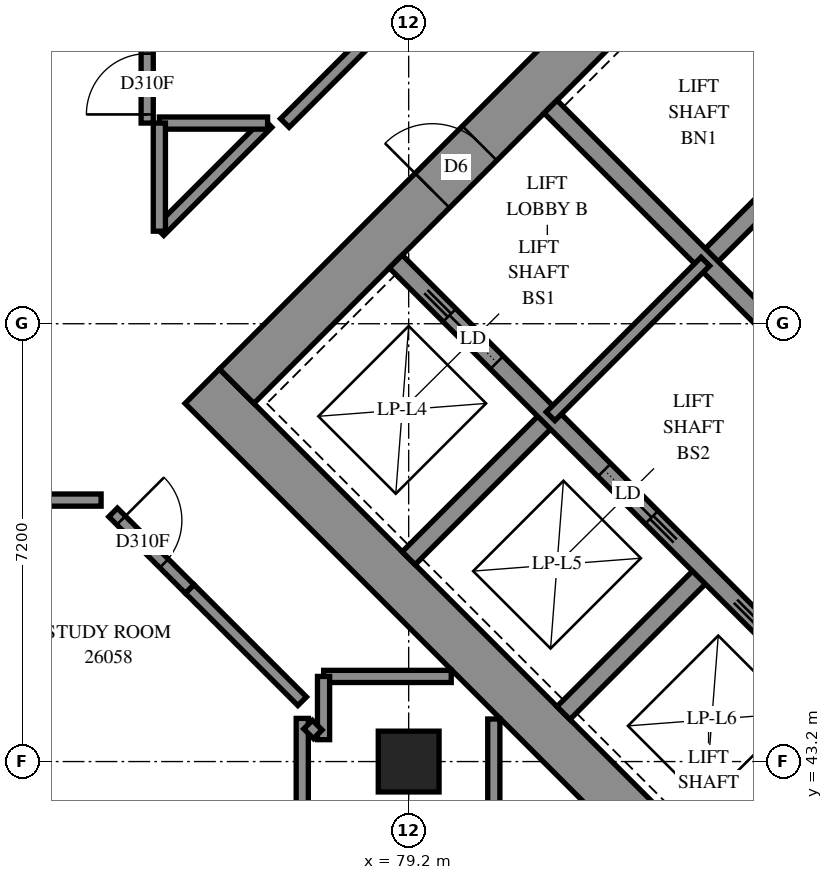
"""IFC4 building model, lengths in metres.
Left out: names, types, materials, properties, quantities, classifications, styles, units other than length and angle.
Written with IfcOpenShell. Run it as: python <this file> out.ifc"""

import sys

from ifc_helpers import new_model, si_unit, direction, frame, frame_2d, origin, origin_2d, place, context, subcontext, project, spatial, polyline, rectangle, outline, extrude, element, fill, save


model = new_model("IFC4")
c1 = context("Model", 3, precision=1e-05, world=origin(), true_north=direction((0.0, 1.0)))
c2 = subcontext(c1, "Body", "Model", "MODEL_VIEW")
j1 = project(units=[si_unit("LENGTHUNIT", "METRE"), si_unit("PLANEANGLEUNIT", "RADIAN")], contexts=[c1])
p1 = place(None, origin())
s1 = spatial("IfcSite", under=j1, at=p1, CompositionType="ELEMENT")
p2 = place(p1, origin())
s2 = spatial("IfcBuilding", under=s1, at=p2, CompositionType="ELEMENT")
p3 = place(p2, frame((0.0, 0.0, 98.2)))
s3 = spatial("IfcBuildingStorey", under=s2, at=p3, CompositionType="ELEMENT", Elevation=98.2)
p4 = place(p3, frame((79.2, 43.2, 0.0), z_axis=(0.0, 0.0, 1.0), x_axis=(1.0, 0.0, 0.0)))
e1 = element("IfcColumn", 1, at=p4, inside=s3, PredefinedType="COLUMN", context=c2, shape_type="SweptSolid", body=[
    extrude(rectangle(XDim=1.0, YDim=1.0, at=origin_2d()), origin(), (0.0, 0.0, 1.0), 3.1),
])
p5 = place(p3, frame((75.806, 49.373, -0.3), z_axis=(0.0, 0.0, 1.0), x_axis=(0.7071067812, -0.7071067812, 0.0)))
e2 = element("IfcWall", 2, at=p5, inside=s3, PredefinedType="SHEAR", context=c2, shape_type="SweptSolid", body=[
    extrude(rectangle(XDim=16.0, YDim=0.8, at=frame_2d((8.0, 0.0))), origin(), (0.0, 0.0, 1.0), 2.7),
])
p6 = place(p3, frame((76.372, 49.373, -0.3), z_axis=(0.0, 0.0, 1.0), x_axis=(0.7071067812, 0.7071067812, 0.0)))
e3 = element("IfcWall", 3, at=p6, inside=s3, PredefinedType="SHEAR", context=c2, shape_type="SweptSolid", body=[
    extrude(rectangle(XDim=14.4, YDim=0.8, at=frame_2d((7.2, 0.0))), origin(), (0.0, 0.0, 1.0), 2.7),
])
p7 = place(p6, frame((4.55, 0.0, 0.3)))
e4 = element("IfcOpeningElement", 4, at=p7, cuts=e3, PredefinedType="OPENING", context=c2, shape_type="SweptSolid", body=[
    extrude(rectangle(XDim=1.1, YDim=2.1, at=frame_2d((0.55, 1.05))), frame((0.0, 0.41, 0.0), z_axis=(0.0, -1.0, 0.0), x_axis=(1.0, 0.0, 0.0)), (0.0, 0.0, 1.0), 0.82),
])
p8 = place(p6, frame((11.35, 0.0, 0.3)))
e5 = element("IfcOpeningElement", 5, at=p8, cuts=e3, PredefinedType="OPENING", context=c2, shape_type="SweptSolid", body=[
    extrude(rectangle(XDim=1.1, YDim=2.1, at=frame_2d((0.55, 1.05))), frame((0.0, 0.41, 0.0), z_axis=(0.0, -1.0, 0.0), x_axis=(1.0, 0.0, 0.0)), (0.0, 0.0, 1.0), 0.82),
])
for number, where, z_axis, x_axis in (
    (6, (79.2, 46.544, 0.0), (0.0, 0.0, 1.0), (0.707, 0.707, 0.0)),
    (7, (84.079, 51.423, 0.0), (0.0, 0.0, 1.0), (0.707, 0.707, 0.0)),
):
    element("IfcWall", number, at=place(p3, frame(where, z_axis=z_axis, x_axis=x_axis)), inside=s3, PredefinedType="SOLIDWALL", context=c2, shape_type="SweptSolid", body=[
        extrude(rectangle(XDim=3.3, YDim=0.3, at=frame_2d((1.65, 0.0))), origin(), (0.0, 0.0, 1.0), 3.1),
    ])
for number, where, z_axis, x_axis in (
    (8, (81.746, 43.999, 0.0), (0.0, 0.0, 1.0), (0.707, 0.707, 0.0)),
    (9, (84.291, 41.453, 0.0), (0.0, 0.0, 1.0), (0.707, 0.707, 0.0)),
):
    element("IfcWall", number, at=place(p3, frame(where, z_axis=z_axis, x_axis=x_axis)), inside=s3, PredefinedType="SOLIDWALL", context=c2, shape_type="SweptSolid", body=[
        extrude(rectangle(XDim=3.3, YDim=0.3, at=frame_2d((1.65, 0.0))), origin(), (0.0, 0.0, 1.0), 3.1),
    ])
p9 = place(p3, frame((78.988, 51.423, 0.0), z_axis=(0.0, 0.0, 1.0), x_axis=(0.7071067812, -0.7071067812, 0.0)))
e10 = element("IfcWall", 10, at=p9, inside=s3, PredefinedType="SOLIDWALL", context=c2, shape_type="SweptSolid", body=[
    extrude(rectangle(XDim=14.4, YDim=0.3, at=frame_2d((7.2, 0.0))), origin(), (0.0, 0.0, 1.0), 3.1),
])
p10 = place(p9, frame((1.25, 0.0, 0.0)))
e11 = element("IfcOpeningElement", 11, at=p10, cuts=e10, PredefinedType="OPENING", context=c2, shape_type="SweptSolid", body=[
    extrude(rectangle(XDim=1.1, YDim=2.1, at=frame_2d((0.55, 1.05))), frame((0.0, 0.16, 0.0), z_axis=(0.0, -1.0, 0.0), x_axis=(1.0, 0.0, 0.0)), (0.0, 0.0, 1.0), 0.32),
])
p11 = place(p9, frame((4.85, 0.0, 0.0)))
e12 = element("IfcOpeningElement", 12, at=p11, cuts=e10, PredefinedType="OPENING", context=c2, shape_type="SweptSolid", body=[
    extrude(rectangle(XDim=1.1, YDim=2.1, at=frame_2d((0.55, 1.05))), frame((0.0, 0.16, 0.0), z_axis=(0.0, -1.0, 0.0), x_axis=(1.0, 0.0, 0.0)), (0.0, 0.0, 1.0), 0.32),
])
p12 = place(p9, frame((8.45, 0.0, 0.0)))
e13 = element("IfcOpeningElement", 13, at=p12, cuts=e10, PredefinedType="OPENING", context=c2, shape_type="SweptSolid", body=[
    extrude(rectangle(XDim=1.1, YDim=2.1, at=frame_2d((0.55, 1.05))), frame((0.0, 0.16, 0.0), z_axis=(0.0, -1.0, 0.0), x_axis=(1.0, 0.0, 0.0)), (0.0, 0.0, 1.0), 0.32),
])
p13 = place(p9, frame((12.05, 0.0, 0.0)))
e14 = element("IfcOpeningElement", 14, at=p13, cuts=e10, PredefinedType="OPENING", context=c2, shape_type="SweptSolid", body=[
    extrude(rectangle(XDim=1.1, YDim=2.1, at=frame_2d((0.55, 1.05))), frame((0.0, 0.16, 0.0), z_axis=(0.0, -1.0, 0.0), x_axis=(1.0, 0.0, 0.0)), (0.0, 0.0, 1.0), 0.32),
])
p14 = place(p3, frame((81.534, 53.969, 0.0), z_axis=(0.0, 0.0, 1.0), x_axis=(0.707103309, -0.7071102534, 0.0)))
e15 = element("IfcWall", 15, at=p14, inside=s3, PredefinedType="SOLIDWALL", context=c2, shape_type="SweptSolid", body=[
    extrude(rectangle(XDim=14.4, YDim=0.3, at=frame_2d((7.2, 0.0))), origin(), (0.0, 0.0, 1.0), 3.1),
])
p15 = place(p14, frame((12.05, 0.0, 0.0)))
e16 = element("IfcOpeningElement", 16, at=p15, cuts=e15, PredefinedType="OPENING", context=c2, shape_type="SweptSolid", body=[
    extrude(rectangle(XDim=1.1, YDim=2.1, at=frame_2d((0.55, 1.05))), frame((0.0, 0.16, 0.0), z_axis=(0.0, -1.0, 0.0), x_axis=(1.0, 0.0, 0.0)), (0.0, 0.0, 1.0), 0.32),
])
p16 = place(p3, frame((83.867, 56.302, 0.0), z_axis=(0.0, 0.0, 1.0), x_axis=(0.7071137256, -0.7070998367, 0.0)))
e17 = element("IfcWall", 17, at=p16, inside=s3, PredefinedType="SOLIDWALL", context=c2, shape_type="SweptSolid", body=[
    extrude(rectangle(XDim=7.2, YDim=0.3, at=frame_2d((3.6, 0.0))), origin(), (0.0, 0.0, 1.0), 3.1),
])
p17 = place(p3, frame((73.129, 42.281, 0.0), z_axis=(0.0, 0.0, 1.0), x_axis=(0.9557583549, -0.2941529654, 0.0)))
e18 = element("IfcWall", 18, at=p17, inside=s3, PredefinedType="SOLIDWALL", context=c2, shape_type="SweptSolid", body=[
    extrude(outline(polyline([(0.06, -0.275), (3.633, -0.275), (3.696, 0.275), (-0.06, 0.275), (0.06, -0.275)])), origin(), (0.0, 0.0, 1.0), 3.1),
])
p18 = place(p17, frame((0.793, 0.0, 0.5)))
e19 = element("IfcOpeningElement", 19, at=p18, cuts=e18, PredefinedType="OPENING", context=c2, shape_type="SweptSolid", body=[
    extrude(rectangle(XDim=1.2, YDim=2.45, at=frame_2d((0.6, 1.225))), frame((0.0, 0.285, 0.0), z_axis=(0.0, -1.0, 0.0), x_axis=(1.0, 0.0, 0.0)), (0.0, 0.0, 1.0), 0.57),
])
p19 = place(p3, frame((81.534, 48.878, 0.0), z_axis=(0.0, 0.0, 1.0), x_axis=(0.707092892, 0.7071206701, 0.0)))
e20 = element("IfcWall", 20, at=p19, inside=s3, PredefinedType="PARTITIONING", context=c2, shape_type="SweptSolid", body=[
    extrude(rectangle(XDim=3.6, YDim=0.2, at=frame_2d((1.8, 0.0))), origin(), (0.0, 0.0, 1.0), 3.1),
])
p20 = place(p3, frame((54.7, 47.5, 0.0), z_axis=(0.0, 0.0, 1.0), x_axis=(1.0, 0.0, 0.0)))
e21 = element("IfcWall", 21, at=p20, inside=s3, PredefinedType="PARTITIONING", context=c2, shape_type="SweptSolid", body=[
    extrude(rectangle(XDim=19.442, YDim=0.2, at=frame_2d((9.721, 0.0))), origin(), (0.0, 0.0, 1.0), 3.1),
])
p21 = place(p20, frame((5.2, 0.0, 0.0)))
e22 = element("IfcOpeningElement", 22, at=p21, cuts=e21, PredefinedType="OPENING", context=c2, shape_type="SweptSolid", body=[
    extrude(rectangle(XDim=0.9, YDim=2.1, at=frame_2d((0.45, 1.05))), frame((0.0, 0.11, 0.0), z_axis=(0.0, -1.0, 0.0), x_axis=(1.0, 0.0, 0.0)), (0.0, 0.0, 1.0), 0.22),
])
p22 = place(p20, frame((6.9, 0.0, 0.0)))
e23 = element("IfcOpeningElement", 23, at=p22, cuts=e21, PredefinedType="OPENING", context=c2, shape_type="SweptSolid", body=[
    extrude(rectangle(XDim=0.9, YDim=2.1, at=frame_2d((0.45, 1.05))), frame((0.0, 0.11, 0.0), z_axis=(0.0, -1.0, 0.0), x_axis=(1.0, 0.0, 0.0)), (0.0, 0.0, 1.0), 0.22),
])
p23 = place(p20, frame((13.963, 0.0, 0.0)))
e24 = element("IfcOpeningElement", 24, at=p23, cuts=e21, PredefinedType="OPENING", context=c2, shape_type="SweptSolid", body=[
    extrude(rectangle(XDim=1.0, YDim=2.1, at=frame_2d((0.5, 1.05))), frame((0.0, 0.11, 0.0), z_axis=(0.0, -1.0, 0.0), x_axis=(1.0, 0.0, 0.0)), (0.0, 0.0, 1.0), 0.22),
])
p24 = place(p3, frame((74.9, 53.7, 0.0), z_axis=(0.0, 0.0, 1.0), x_axis=(0.0, 1.0, 0.0)))
e25 = element("IfcWall", 25, at=p24, inside=s3, PredefinedType="PARTITIONING", context=c2, shape_type="SweptSolid", body=[
    extrude(rectangle(XDim=6.052, YDim=0.2, at=frame_2d((3.026, 0.0))), origin(), (0.0, 0.0, 1.0), 3.1),
])
p25 = place(p24, frame((0.142, 0.0, 0.0)))
e26 = element("IfcOpeningElement", 26, at=p25, cuts=e25, PredefinedType="OPENING", context=c2, shape_type="SweptSolid", body=[
    extrude(rectangle(XDim=1.0, YDim=2.1, at=frame_2d((0.5, 1.05))), frame((0.0, 0.11, 0.0), z_axis=(0.0, -1.0, 0.0), x_axis=(1.0, 0.0, 0.0)), (0.0, 0.0, 1.0), 0.22),
])
p26 = place(p3, frame((77.45, 41.046, 0.0), z_axis=(0.0, 0.0, 1.0), x_axis=(0.0, 1.0, 0.0)))
e27 = element("IfcWall", 27, at=p26, inside=s3, PredefinedType="PARTITIONING", context=c2, shape_type="SweptSolid", body=[
    extrude(rectangle(XDim=2.864, YDim=0.2, at=frame_2d((1.432, 0.0))), origin(), (0.0, 0.0, 1.0), 3.1),
])
p27 = place(p3, frame((77.163, 53.701, 0.0), z_axis=(0.0, 0.0, 1.0), x_axis=(0.7071067812, 0.7071067812, 0.0)))
e28 = element("IfcWall", 28, at=p27, inside=s3, PredefinedType="PARTITIONING", context=c2, shape_type="SweptSolid", body=[
    extrude(rectangle(XDim=2.679, YDim=0.2, at=frame_2d((1.339, 0.0))), origin(), (0.0, 0.0, 1.0), 3.1),
])
p28 = place(p3, frame((75.598, 46.04, 0.0), z_axis=(0.0, 0.0, 1.0), x_axis=(0.7074891043, -0.7067242512, 0.0)))
e29 = element("IfcWall", 29, at=p28, inside=s3, PredefinedType="PARTITIONING", context=c2, shape_type="SweptSolid", body=[
    extrude(rectangle(XDim=2.615, YDim=0.2, at=frame_2d((1.308, 0.0))), origin(), (0.0, 0.0, 1.0), 3.1),
])
p29 = place(p3, frame((75.102, 51.922, 0.0), z_axis=(0.0, 0.0, 1.0), x_axis=(0.7071067812, 0.7071067812, 0.0)))
e30 = element("IfcWall", 30, at=p29, inside=s3, PredefinedType="PARTITIONING", context=c2, shape_type="SweptSolid", body=[
    extrude(rectangle(XDim=2.514, YDim=0.2, at=frame_2d((1.257, 0.0))), origin(), (0.0, 0.0, 1.0), 3.1),
])
for number, where, z_axis, x_axis in (
    (31, (77.802, 44.6, 0.0), (0.0, 0.0, 1.0), (1.0, 0.0, 0.0)),
    (32, (80.6, 41.802, 0.0), (0.0, 0.0, 1.0), (0.0, 1.0, 0.0)),
):
    element("IfcWall", number, at=place(p3, frame(where, z_axis=z_axis, x_axis=x_axis)), inside=s3, PredefinedType="PARTITIONING", context=c2, shape_type="SweptSolid", body=[
        extrude(rectangle(XDim=2.098, YDim=0.2, at=frame_2d((1.049, 0.0))), origin(), (0.0, 0.0, 1.0), 3.1),
    ])
p30 = place(p3, frame((75.1, 53.7, 0.0), z_axis=(0.0, 0.0, 1.0), x_axis=(1.0, 0.0, 0.0)))
e33 = element("IfcWall", 33, at=p30, inside=s3, PredefinedType="PARTITIONING", context=c2, shape_type="SweptSolid", body=[
    extrude(rectangle(XDim=1.78, YDim=0.2, at=frame_2d((0.89, 0.0))), origin(), (0.0, 0.0, 1.0), 3.1),
])
p31 = place(p3, frame((74.339, 47.297, 0.0), z_axis=(0.0, 0.0, 1.0), x_axis=(0.7071067812, -0.7071067812, 0.0)))
e34 = element("IfcWall", 34, at=p31, inside=s3, PredefinedType="PARTITIONING", context=c2, shape_type="SweptSolid", body=[
    extrude(rectangle(XDim=1.779, YDim=0.2, at=frame_2d((0.889, 0.0))), origin(), (0.0, 0.0, 1.0), 3.1),
])
p32 = place(p31, frame((0.186, 0.0, 0.0)))
e35 = element("IfcOpeningElement", 35, at=p32, cuts=e34, PredefinedType="OPENING", context=c2, shape_type="SweptSolid", body=[
    extrude(rectangle(XDim=1.0, YDim=2.1, at=frame_2d((0.5, 1.05))), frame((0.0, 0.11, 0.0), z_axis=(0.0, -1.0, 0.0), x_axis=(1.0, 0.0, 0.0)), (0.0, 0.0, 1.0), 0.22),
])
p33 = place(p3, frame((75.1, 51.922, 0.0), z_axis=(0.0, 0.0, 1.0), x_axis=(0.0, 1.0, 0.0)))
e36 = element("IfcWall", 36, at=p33, inside=s3, PredefinedType="PARTITIONING", context=c2, shape_type="SweptSolid", body=[
    extrude(rectangle(XDim=1.778, YDim=0.2, at=frame_2d((0.889, 0.0))), origin(), (0.0, 0.0, 1.0), 3.1),
])
p34 = place(p3, frame((77.8, 43.56, 0.0), z_axis=(0.0, 0.0, 1.0), x_axis=(0.0, 1.0, 0.0)))
e37 = element("IfcWall", 37, at=p34, inside=s3, PredefinedType="PARTITIONING", context=c2, shape_type="SweptSolid", body=[
    extrude(rectangle(XDim=1.04, YDim=0.2, at=frame_2d((0.52, 0.0))), origin(), (0.0, 0.0, 1.0), 3.1),
])
p35 = place(p3, frame((77.546, 43.808, 0.0), z_axis=(0.0, 0.0, 1.0), x_axis=(0.707329037, -0.7068844555, 0.0)))
e38 = element("IfcWall", 38, at=p35, inside=s3, PredefinedType="PARTITIONING", context=c2, shape_type="SweptSolid", body=[
    extrude(rectangle(XDim=0.225, YDim=0.2, at=frame_2d((0.112, 0.0))), origin(), (0.0, 0.0, 1.0), 3.1),
])
p36 = place(p7, origin())
e39 = element("IfcDoor", 39, at=p36, inside=s3, OperationType="DOUBLE_DOOR_SINGLE_SWING", PredefinedType="DOOR", context=c2, shape_type="SweptSolid", body=[
    extrude(rectangle(XDim=1.1, YDim=2.1, at=frame_2d((0.55, 1.05))), frame((0.0, 0.025, 0.0), z_axis=(0.0, -1.0, 0.0), x_axis=(1.0, 0.0, 0.0)), (0.0, 0.0, 1.0), 0.05),
])
fill(e4, e39)
p37 = place(p10, origin())
e40 = element("IfcDoor", 40, at=p37, inside=s3, OperationType="SLIDING_TO_LEFT", PredefinedType="DOOR", context=c2, shape_type="SweptSolid", body=[
    extrude(rectangle(XDim=1.1, YDim=2.1, at=frame_2d((0.55, 1.05))), frame((0.0, 0.025, 0.0), z_axis=(0.0, -1.0, 0.0), x_axis=(1.0, 0.0, 0.0)), (0.0, 0.0, 1.0), 0.05),
])
fill(e11, e40)
p38 = place(p11, origin())
e41 = element("IfcDoor", 41, at=p38, inside=s3, OperationType="SLIDING_TO_RIGHT", PredefinedType="DOOR", context=c2, shape_type="SweptSolid", body=[
    extrude(rectangle(XDim=1.1, YDim=2.1, at=frame_2d((0.55, 1.05))), frame((0.0, 0.025, 0.0), z_axis=(0.0, -1.0, 0.0), x_axis=(1.0, 0.0, 0.0)), (0.0, 0.0, 1.0), 0.05),
])
fill(e12, e41)
p39 = place(p25, origin())
e42 = element("IfcDoor", 42, at=p39, inside=s3, OperationType="SINGLE_SWING_LEFT", PredefinedType="DOOR", context=c2, shape_type="SweptSolid", body=[
    extrude(rectangle(XDim=1.0, YDim=2.1, at=frame_2d((0.5, 1.05))), frame((0.0, 0.025, 0.0), z_axis=(0.0, -1.0, 0.0), x_axis=(1.0, 0.0, 0.0)), (0.0, 0.0, 1.0), 0.05),
])
fill(e26, e42)
p40 = place(p32, origin())
e43 = element("IfcDoor", 43, at=p40, inside=s3, OperationType="SINGLE_SWING_LEFT", PredefinedType="DOOR", context=c2, shape_type="SweptSolid", body=[
    extrude(rectangle(XDim=1.0, YDim=2.1, at=frame_2d((0.5, 1.05))), frame((0.0, 0.025, 0.0), z_axis=(0.0, -1.0, 0.0), x_axis=(1.0, 0.0, 0.0)), (0.0, 0.0, 1.0), 0.05),
])
fill(e35, e43)
save(model, sys.argv[1])
